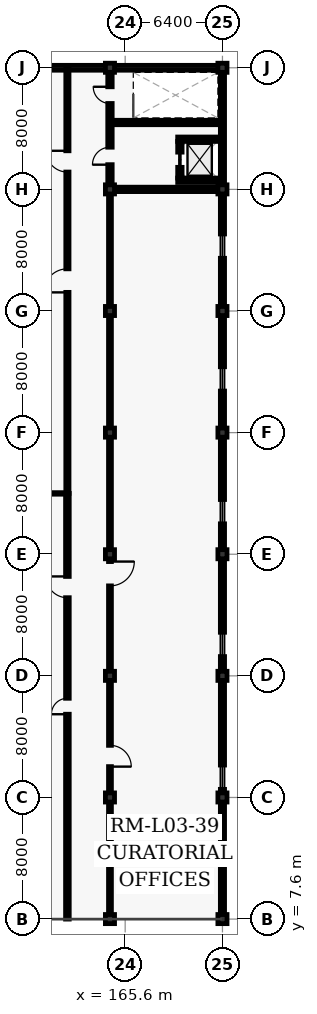
"""IFC4 building model, lengths in metres.
Left out: names, types, materials, properties, quantities, classifications, styles, units other than length and angle.
Written with IfcOpenShell. Run it as: python <this file> out.ifc"""

import sys

from ifc_helpers import new_model, si_unit, direction, frame, frame_2d, origin, origin_2d, place, context, subcontext, project, spatial, rectangle, extrude, element, fill, save


model = new_model("IFC4")
c1 = context("Model", 3, precision=1e-05, world=origin(), true_north=direction((0.0, 1.0)))
c2 = subcontext(c1, "Body", "Model", "MODEL_VIEW")
j1 = project(units=[si_unit("LENGTHUNIT", "METRE"), si_unit("PLANEANGLEUNIT", "RADIAN")], contexts=[c1])
p1 = place(None, origin())
s1 = spatial("IfcSite", under=j1, at=p1, CompositionType="ELEMENT")
p2 = place(p1, origin())
s2 = spatial("IfcBuilding", under=s1, at=p2, CompositionType="ELEMENT")
p3 = place(p2, frame((0.0, 0.0, 15.6)))
s3 = spatial("IfcBuildingStorey", under=s2, at=p3, CompositionType="ELEMENT", Elevation=15.6)
for number, where, z_axis, x_axis in (
    (1, (164.6, 7.6, 0.0), (0.0, 0.0, 1.0), (1.0, 0.0, 0.0)),
    (2, (164.6, 15.6, 0.0), (0.0, 0.0, 1.0), (1.0, 0.0, 0.0)),
    (3, (164.6, 23.6, 0.0), (0.0, 0.0, 1.0), (1.0, 0.0, 0.0)),
    (4, (164.6, 31.6, 0.0), (0.0, 0.0, 1.0), (1.0, 0.0, 0.0)),
    (5, (164.6, 39.6, 0.0), (0.0, 0.0, 1.0), (1.0, 0.0, 0.0)),
    (6, (164.6, 47.6, 0.0), (0.0, 0.0, 1.0), (1.0, 0.0, 0.0)),
    (7, (164.6, 55.6, 0.0), (0.0, 0.0, 1.0), (1.0, 0.0, 0.0)),
    (8, (164.6, 63.6, 0.0), (0.0, 0.0, 1.0), (1.0, 0.0, 0.0)),
    (9, (172.0, 7.6, 0.0), (0.0, 0.0, 1.0), (1.0, 0.0, 0.0)),
    (10, (172.0, 15.6, 0.0), (0.0, 0.0, 1.0), (1.0, 0.0, 0.0)),
    (11, (172.0, 23.6, 0.0), (0.0, 0.0, 1.0), (1.0, 0.0, 0.0)),
    (12, (172.0, 31.6, 0.0), (0.0, 0.0, 1.0), (1.0, 0.0, 0.0)),
    (13, (172.0, 39.6, 0.0), (0.0, 0.0, 1.0), (1.0, 0.0, 0.0)),
    (14, (172.0, 47.6, 0.0), (0.0, 0.0, 1.0), (1.0, 0.0, 0.0)),
    (15, (172.0, 55.6, 0.0), (0.0, 0.0, 1.0), (1.0, 0.0, 0.0)),
    (16, (172.0, 63.6, 0.0), (0.0, 0.0, 1.0), (1.0, 0.0, 0.0)),
):
    element("IfcColumn", number, at=place(p3, frame(where, z_axis=z_axis, x_axis=x_axis)), inside=s3, PredefinedType="COLUMN", context=c2, shape_type="SweptSolid", body=[
        extrude(rectangle(XDim=0.6, YDim=0.6, at=origin_2d()), origin(), (0.0, 0.0, 1.0), 4.8),
    ])
p4 = place(p3, frame((149.2, 63.6, 0.0), z_axis=(0.0, 0.0, 1.0), x_axis=(1.0, 0.0, 0.0)))
e17 = element("IfcWall", 17, at=p4, inside=s3, PredefinedType="SOLIDWALL", context=c2, shape_type="SweptSolid", body=[
    extrude(rectangle(XDim=22.8, YDim=0.32, at=frame_2d((11.4, 0.0))), origin(), (0.0, 0.0, 1.0), 3.705),
])
p5 = place(p4, frame((2.2, 0.0, 0.9)))
e18 = element("IfcOpeningElement", 18, at=p5, cuts=e17, PredefinedType="OPENING", context=c2, shape_type="SweptSolid", body=[
    extrude(rectangle(XDim=1.6, YDim=1.65, at=frame_2d((0.8, 0.825))), frame((0.0, 0.17, 0.0), z_axis=(0.0, -1.0, 0.0), x_axis=(1.0, 0.0, 0.0)), (0.0, 0.0, 1.0), 0.34),
])
p6 = place(p4, frame((8.6, 0.0, 0.9)))
e19 = element("IfcOpeningElement", 19, at=p6, cuts=e17, PredefinedType="OPENING", context=c2, shape_type="SweptSolid", body=[
    extrude(rectangle(XDim=1.6, YDim=1.65, at=frame_2d((0.8, 0.825))), frame((0.0, 0.17, 0.0), z_axis=(0.0, -1.0, 0.0), x_axis=(1.0, 0.0, 0.0)), (0.0, 0.0, 1.0), 0.34),
])
p7 = place(p3, frame((172.0, 63.6, 0.0), z_axis=(0.0, 0.0, 1.0), x_axis=(0.0, -1.0, 0.0)))
e20 = element("IfcWall", 20, at=p7, inside=s3, PredefinedType="SOLIDWALL", context=c2, shape_type="SweptSolid", body=[
    extrude(rectangle(XDim=56.0, YDim=0.275, at=frame_2d((28.0, 0.0))), origin(), (0.0, 0.0, 1.0), 3.705),
])
p8 = place(p7, frame((10.933, 0.0, 0.8)))
e21 = element("IfcOpeningElement", 21, at=p8, cuts=e20, PredefinedType="OPENING", context=c2, shape_type="SweptSolid", body=[
    extrude(rectangle(XDim=1.6, YDim=1.65, at=frame_2d((0.8, 0.825))), frame((0.0, 0.147, 0.0), z_axis=(0.0, -1.0, 0.0), x_axis=(1.0, 0.0, 0.0)), (0.0, 0.0, 1.0), 0.295),
])
p9 = place(p7, frame((19.667, 0.0, 0.8)))
e22 = element("IfcOpeningElement", 22, at=p9, cuts=e20, PredefinedType="OPENING", context=c2, shape_type="SweptSolid", body=[
    extrude(rectangle(XDim=1.6, YDim=1.65, at=frame_2d((0.8, 0.825))), frame((0.0, 0.147, 0.0), z_axis=(0.0, -1.0, 0.0), x_axis=(1.0, 0.0, 0.0)), (0.0, 0.0, 1.0), 0.295),
])
p10 = place(p7, frame((28.4, 0.0, 0.8)))
e23 = element("IfcOpeningElement", 23, at=p10, cuts=e20, PredefinedType="OPENING", context=c2, shape_type="SweptSolid", body=[
    extrude(rectangle(XDim=1.6, YDim=1.65, at=frame_2d((0.8, 0.825))), frame((0.0, 0.147, 0.0), z_axis=(0.0, -1.0, 0.0), x_axis=(1.0, 0.0, 0.0)), (0.0, 0.0, 1.0), 0.295),
])
p11 = place(p7, frame((37.133, 0.0, 0.8)))
e24 = element("IfcOpeningElement", 24, at=p11, cuts=e20, PredefinedType="OPENING", context=c2, shape_type="SweptSolid", body=[
    extrude(rectangle(XDim=1.6, YDim=1.65, at=frame_2d((0.8, 0.825))), frame((0.0, 0.147, 0.0), z_axis=(0.0, -1.0, 0.0), x_axis=(1.0, 0.0, 0.0)), (0.0, 0.0, 1.0), 0.295),
])
p12 = place(p7, frame((45.867, 0.0, 0.8)))
e25 = element("IfcOpeningElement", 25, at=p12, cuts=e20, PredefinedType="OPENING", context=c2, shape_type="SweptSolid", body=[
    extrude(rectangle(XDim=1.6, YDim=1.65, at=frame_2d((0.8, 0.825))), frame((0.0, 0.147, 0.0), z_axis=(0.0, -1.0, 0.0), x_axis=(1.0, 0.0, 0.0)), (0.0, 0.0, 1.0), 0.295),
])
p13 = place(p3, frame((164.902, 55.6, 0.0), z_axis=(0.0, 0.0, 1.0), x_axis=(1.0, 0.0, 0.0)))
e26 = element("IfcWall", 26, at=p13, inside=s3, PredefinedType="SHEAR", context=c2, shape_type="SweptSolid", body=[
    extrude(rectangle(XDim=6.796, YDim=0.29, at=frame_2d((3.398, 0.0))), origin(), (0.0, 0.0, 1.0), 4.555),
])
p14 = place(p3, frame((164.6, 55.902, 0.0), z_axis=(0.0, 0.0, 1.0), x_axis=(0.0, 1.0, 0.0)))
e27 = element("IfcWall", 27, at=p14, inside=s3, PredefinedType="SHEAR", context=c2, shape_type="SweptSolid", body=[
    extrude(rectangle(XDim=7.396, YDim=0.29, at=frame_2d((3.698, 0.0))), origin(), (0.0, 0.0, 1.0), 4.555),
])
p15 = place(p14, frame((5.348, 0.0, 0.0)))
e28 = element("IfcOpeningElement", 28, at=p15, cuts=e27, PredefinedType="OPENING", context=c2, shape_type="SweptSolid", body=[
    extrude(rectangle(XDim=1.1, YDim=2.15, at=frame_2d((0.55, 1.075))), frame((0.0, 0.155, 0.0), z_axis=(0.0, -1.0, 0.0), x_axis=(1.0, 0.0, 0.0)), (0.0, 0.0, 1.0), 0.31),
])
p16 = place(p14, frame((1.323, 0.0, 0.0)))
e29 = element("IfcOpeningElement", 29, at=p16, cuts=e27, PredefinedType="OPENING", context=c2, shape_type="SweptSolid", body=[
    extrude(rectangle(XDim=1.15, YDim=2.2, at=frame_2d((0.575, 1.1))), frame((0.0, 0.155, 0.0), z_axis=(0.0, -1.0, 0.0), x_axis=(1.0, 0.0, 0.0)), (0.0, 0.0, 1.0), 0.31),
])
p17 = place(p3, frame((164.745, 60.0, 0.0), z_axis=(0.0, 0.0, 1.0), x_axis=(1.0, 0.0, 0.0)))
e30 = element("IfcWall", 30, at=p17, inside=s3, PredefinedType="SHEAR", context=c2, shape_type="SweptSolid", body=[
    extrude(rectangle(XDim=7.11, YDim=0.29, at=frame_2d((3.555, 0.0))), origin(), (0.0, 0.0, 1.0), 4.555),
])
for number, where, z_axis, x_axis in (
    (31, (169.055, 56.2, 0.0), (0.0, 0.0, 1.0), (1.0, 0.0, 0.0)),
    (32, (169.055, 58.9, 0.0), (0.0, 0.0, 1.0), (1.0, 0.0, 0.0)),
):
    element("IfcWall", number, at=place(p3, frame(where, z_axis=z_axis, x_axis=x_axis)), inside=s3, PredefinedType="SHEAR", context=c2, shape_type="SweptSolid", body=[
        extrude(rectangle(XDim=2.89, YDim=0.29, at=frame_2d((1.445, 0.0))), origin(), (0.0, 0.0, 1.0), 4.555),
    ])
p18 = place(p3, frame((169.2, 56.345, 0.0), z_axis=(0.0, 0.0, 1.0), x_axis=(0.0, 1.0, 0.0)))
e33 = element("IfcWall", 33, at=p18, inside=s3, PredefinedType="SHEAR", context=c2, shape_type="SweptSolid", body=[
    extrude(rectangle(XDim=2.41, YDim=0.29, at=frame_2d((1.205, 0.0))), origin(), (0.0, 0.0, 1.0), 4.555),
])
p19 = place(p18, frame((0.705, 0.0, 0.0)))
e34 = element("IfcOpeningElement", 34, at=p19, cuts=e33, PredefinedType="OPENING", context=c2, shape_type="SweptSolid", body=[
    extrude(rectangle(XDim=1.0, YDim=2.15, at=frame_2d((0.5, 1.075))), frame((0.0, 0.155, 0.0), z_axis=(0.0, -1.0, 0.0), x_axis=(1.0, 0.0, 0.0)), (0.0, 0.0, 1.0), 0.31),
])
p20 = place(p3, frame((161.8, 7.6, 0.0), z_axis=(0.0, 0.0, 1.0), x_axis=(0.0, 1.0, 0.0)))
e35 = element("IfcWall", 35, at=p20, inside=s3, PredefinedType="PARTITIONING", context=c2, shape_type="SweptSolid", body=[
    extrude(rectangle(XDim=28.0, YDim=0.24, at=frame_2d((14.0, 0.0))), origin(), (0.0, 0.0, 1.0), 4.555),
])
p21 = place(p20, frame((13.475, 0.0, 0.0)))
e36 = element("IfcOpeningElement", 36, at=p21, cuts=e35, PredefinedType="OPENING", context=c2, shape_type="SweptSolid", body=[
    extrude(rectangle(XDim=1.05, YDim=2.15, at=frame_2d((0.525, 1.075))), frame((0.0, 0.13, 0.0), z_axis=(0.0, -1.0, 0.0), x_axis=(1.0, 0.0, 0.0)), (0.0, 0.0, 1.0), 0.26),
])
p22 = place(p20, frame((21.14, 0.0, 0.0)))
e37 = element("IfcOpeningElement", 37, at=p22, cuts=e35, PredefinedType="OPENING", context=c2, shape_type="SweptSolid", body=[
    extrude(rectangle(XDim=1.4, YDim=2.25, at=frame_2d((0.7, 1.125))), frame((0.0, 0.13, 0.0), z_axis=(0.0, -1.0, 0.0), x_axis=(1.0, 0.0, 0.0)), (0.0, 0.0, 1.0), 0.26),
])
p23 = place(p3, frame((161.8, 35.6, 0.0), z_axis=(0.0, 0.0, 1.0), x_axis=(0.0, 1.0, 0.0)))
e38 = element("IfcWall", 38, at=p23, inside=s3, PredefinedType="PARTITIONING", context=c2, shape_type="SweptSolid", body=[
    extrude(rectangle(XDim=28.0, YDim=0.21, at=frame_2d((14.0, 0.0))), origin(), (0.0, 0.0, 1.0), 4.555),
])
p24 = place(p23, frame((13.225, 0.0, 0.0)))
e39 = element("IfcOpeningElement", 39, at=p24, cuts=e38, PredefinedType="OPENING", context=c2, shape_type="SweptSolid", body=[
    extrude(rectangle(XDim=1.55, YDim=2.25, at=frame_2d((0.775, 1.125))), frame((0.0, 0.115, 0.0), z_axis=(0.0, -1.0, 0.0), x_axis=(1.0, 0.0, 0.0)), (0.0, 0.0, 1.0), 0.23),
])
p25 = place(p23, frame((21.14, 0.0, 0.0)))
e40 = element("IfcOpeningElement", 40, at=p25, cuts=e38, PredefinedType="OPENING", context=c2, shape_type="SweptSolid", body=[
    extrude(rectangle(XDim=1.4, YDim=2.25, at=frame_2d((0.7, 1.125))), frame((0.0, 0.115, 0.0), z_axis=(0.0, -1.0, 0.0), x_axis=(1.0, 0.0, 0.0)), (0.0, 0.0, 1.0), 0.23),
])
p26 = place(p3, frame((164.6, 55.298, 0.0), z_axis=(0.0, 0.0, 1.0), x_axis=(0.0, -1.0, 0.0)))
e41 = element("IfcWall", 41, at=p26, inside=s3, PredefinedType="PARTITIONING", context=c2, shape_type="SweptSolid", body=[
    extrude(rectangle(XDim=47.396, YDim=0.19, at=frame_2d((23.698, 0.0))), origin(), (0.0, 0.0, 1.0), 3.705),
])
p27 = place(p26, frame((24.18, 0.0, 0.0)))
e42 = element("IfcOpeningElement", 42, at=p27, cuts=e41, PredefinedType="OPENING", context=c2, shape_type="SweptSolid", body=[
    extrude(rectangle(XDim=1.6, YDim=2.3, at=frame_2d((0.8, 1.15))), frame((0.0, 0.105, 0.0), z_axis=(0.0, -1.0, 0.0), x_axis=(1.0, 0.0, 0.0)), (0.0, 0.0, 1.0), 0.21),
])
p28 = place(p26, frame((36.269, 0.0, 0.0)))
e43 = element("IfcOpeningElement", 43, at=p28, cuts=e41, PredefinedType="OPENING", context=c2, shape_type="SweptSolid", body=[
    extrude(rectangle(XDim=1.4, YDim=2.25, at=frame_2d((0.7, 1.125))), frame((0.0, 0.105, 0.0), z_axis=(0.0, -1.0, 0.0), x_axis=(1.0, 0.0, 0.0)), (0.0, 0.0, 1.0), 0.21),
])
p29 = place(p3, frame((149.2, 35.6, 0.0), z_axis=(0.0, 0.0, 1.0), x_axis=(1.0, 0.0, 0.0)))
e44 = element("IfcWall", 44, at=p29, inside=s3, PredefinedType="PARTITIONING", context=c2, shape_type="SweptSolid", body=[
    extrude(rectangle(XDim=12.6, YDim=0.1, at=frame_2d((6.3, 0.0))), origin(), (0.0, 0.0, 1.0), 4.005),
])
p30 = place(p8, origin())
e45 = element("IfcWindow", 45, at=p30, inside=s3, PartitioningType="SINGLE_PANEL", PredefinedType="WINDOW", context=c2, shape_type="SweptSolid", body=[
    extrude(rectangle(XDim=1.6, YDim=1.65, at=frame_2d((0.8, 0.825))), frame((0.0, 0.03, 0.0), z_axis=(0.0, -1.0, 0.0), x_axis=(1.0, 0.0, 0.0)), (0.0, 0.0, 1.0), 0.06),
])
fill(e21, e45)
p31 = place(p9, origin())
e46 = element("IfcWindow", 46, at=p31, inside=s3, PartitioningType="SINGLE_PANEL", PredefinedType="WINDOW", context=c2, shape_type="SweptSolid", body=[
    extrude(rectangle(XDim=1.6, YDim=1.65, at=frame_2d((0.8, 0.825))), frame((0.0, 0.03, 0.0), z_axis=(0.0, -1.0, 0.0), x_axis=(1.0, 0.0, 0.0)), (0.0, 0.0, 1.0), 0.06),
])
fill(e22, e46)
p32 = place(p10, origin())
e47 = element("IfcWindow", 47, at=p32, inside=s3, PartitioningType="SINGLE_PANEL", PredefinedType="WINDOW", context=c2, shape_type="SweptSolid", body=[
    extrude(rectangle(XDim=1.6, YDim=1.65, at=frame_2d((0.8, 0.825))), frame((0.0, 0.03, 0.0), z_axis=(0.0, -1.0, 0.0), x_axis=(1.0, 0.0, 0.0)), (0.0, 0.0, 1.0), 0.06),
])
fill(e23, e47)
p33 = place(p11, origin())
e48 = element("IfcWindow", 48, at=p33, inside=s3, PartitioningType="SINGLE_PANEL", PredefinedType="WINDOW", context=c2, shape_type="SweptSolid", body=[
    extrude(rectangle(XDim=1.6, YDim=1.65, at=frame_2d((0.8, 0.825))), frame((0.0, 0.03, 0.0), z_axis=(0.0, -1.0, 0.0), x_axis=(1.0, 0.0, 0.0)), (0.0, 0.0, 1.0), 0.06),
])
fill(e24, e48)
p34 = place(p12, origin())
e49 = element("IfcWindow", 49, at=p34, inside=s3, PartitioningType="SINGLE_PANEL", PredefinedType="WINDOW", context=c2, shape_type="SweptSolid", body=[
    extrude(rectangle(XDim=1.6, YDim=1.65, at=frame_2d((0.8, 0.825))), frame((0.0, 0.03, 0.0), z_axis=(0.0, -1.0, 0.0), x_axis=(1.0, 0.0, 0.0)), (0.0, 0.0, 1.0), 0.06),
])
fill(e25, e49)
p35 = place(p15, origin())
e50 = element("IfcDoor", 50, at=p35, inside=s3, OperationType="SINGLE_SWING_RIGHT", PredefinedType="DOOR", context=c2, shape_type="SweptSolid", body=[
    extrude(rectangle(XDim=1.1, YDim=2.15, at=frame_2d((0.55, 1.075))), frame((0.0, 0.025, 0.0), z_axis=(0.0, -1.0, 0.0), x_axis=(1.0, 0.0, 0.0)), (0.0, 0.0, 1.0), 0.05),
])
fill(e28, e50)
p36 = place(p16, origin())
e51 = element("IfcDoor", 51, at=p36, inside=s3, OperationType="SINGLE_SWING_LEFT", PredefinedType="DOOR", context=c2, shape_type="SweptSolid", body=[
    extrude(rectangle(XDim=1.15, YDim=2.2, at=frame_2d((0.575, 1.1))), frame((0.0, 0.025, 0.0), z_axis=(0.0, -1.0, 0.0), x_axis=(1.0, 0.0, 0.0)), (0.0, 0.0, 1.0), 0.05),
])
fill(e29, e51)
p37 = place(p19, origin())
e52 = element("IfcDoor", 52, at=p37, inside=s3, OperationType="SLIDING_TO_LEFT", PredefinedType="DOOR", context=c2, shape_type="SweptSolid", body=[
    extrude(rectangle(XDim=1.0, YDim=2.15, at=frame_2d((0.5, 1.075))), frame((0.0, 0.025, 0.0), z_axis=(0.0, -1.0, 0.0), x_axis=(1.0, 0.0, 0.0)), (0.0, 0.0, 1.0), 0.05),
])
fill(e34, e52)
p38 = place(p21, origin())
e53 = element("IfcDoor", 53, at=p38, inside=s3, OperationType="SINGLE_SWING_LEFT", PredefinedType="DOOR", context=c2, shape_type="SweptSolid", body=[
    extrude(rectangle(XDim=1.05, YDim=2.15, at=frame_2d((0.525, 1.075))), frame((0.0, 0.025, 0.0), z_axis=(0.0, -1.0, 0.0), x_axis=(1.0, 0.0, 0.0)), (0.0, 0.0, 1.0), 0.05),
])
fill(e36, e53)
p39 = place(p22, origin())
e54 = element("IfcDoor", 54, at=p39, inside=s3, OperationType="SINGLE_SWING_RIGHT", PredefinedType="DOOR", context=c2, shape_type="SweptSolid", body=[
    extrude(rectangle(XDim=1.4, YDim=2.25, at=frame_2d((0.7, 1.125))), frame((0.0, 0.025, 0.0), z_axis=(0.0, -1.0, 0.0), x_axis=(1.0, 0.0, 0.0)), (0.0, 0.0, 1.0), 0.05),
])
fill(e37, e54)
p40 = place(p24, origin())
e55 = element("IfcDoor", 55, at=p40, inside=s3, OperationType="SINGLE_SWING_LEFT", PredefinedType="DOOR", context=c2, shape_type="SweptSolid", body=[
    extrude(rectangle(XDim=1.55, YDim=2.25, at=frame_2d((0.775, 1.125))), frame((0.0, 0.025, 0.0), z_axis=(0.0, -1.0, 0.0), x_axis=(1.0, 0.0, 0.0)), (0.0, 0.0, 1.0), 0.05),
])
fill(e39, e55)
p41 = place(p25, origin())
e56 = element("IfcDoor", 56, at=p41, inside=s3, OperationType="SINGLE_SWING_RIGHT", PredefinedType="DOOR", context=c2, shape_type="SweptSolid", body=[
    extrude(rectangle(XDim=1.4, YDim=2.25, at=frame_2d((0.7, 1.125))), frame((0.0, 0.025, 0.0), z_axis=(0.0, -1.0, 0.0), x_axis=(1.0, 0.0, 0.0)), (0.0, 0.0, 1.0), 0.05),
])
fill(e40, e56)
p42 = place(p27, origin())
e57 = element("IfcDoor", 57, at=p42, inside=s3, OperationType="SINGLE_SWING_LEFT", PredefinedType="DOOR", context=c2, shape_type="SweptSolid", body=[
    extrude(rectangle(XDim=1.6, YDim=2.3, at=frame_2d((0.8, 1.15))), frame((0.0, 0.025, 0.0), z_axis=(0.0, -1.0, 0.0), x_axis=(1.0, 0.0, 0.0)), (0.0, 0.0, 1.0), 0.05),
])
fill(e42, e57)
p43 = place(p28, origin())
e58 = element("IfcDoor", 58, at=p43, inside=s3, OperationType="SINGLE_SWING_RIGHT", PredefinedType="DOOR", context=c2, shape_type="SweptSolid", body=[
    extrude(rectangle(XDim=1.4, YDim=2.25, at=frame_2d((0.7, 1.125))), frame((0.0, 0.025, 0.0), z_axis=(0.0, -1.0, 0.0), x_axis=(1.0, 0.0, 0.0)), (0.0, 0.0, 1.0), 0.05),
])
fill(e43, e58)
save(model, sys.argv[1])
